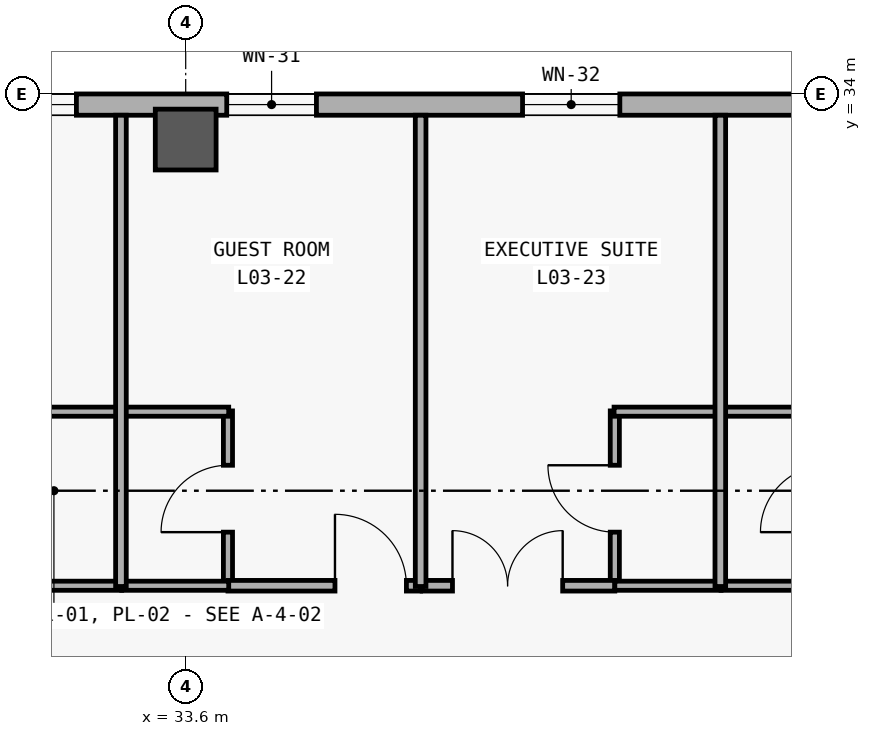
"""IFC4 building model, lengths in metres.
Left out: names, types, materials, properties, quantities, classifications, styles, units other than length and angle.
Written with IfcOpenShell. Run it as: python <this file> out.ifc"""

import sys

from ifc_helpers import new_model, si_unit, direction, frame, frame_2d, origin, origin_2d, place, context, subcontext, project, spatial, rectangle, extrude, element, fill, save


model = new_model("IFC4")
c1 = context("Model", 3, precision=1e-05, world=origin(), true_north=direction((0.0, 1.0)))
c2 = subcontext(c1, "Body", "Model", "MODEL_VIEW")
j1 = project(units=[si_unit("LENGTHUNIT", "METRE"), si_unit("PLANEANGLEUNIT", "RADIAN")], contexts=[c1])
p1 = place(None, origin())
s1 = spatial("IfcSite", under=j1, at=p1, CompositionType="ELEMENT")
p2 = place(p1, origin())
s2 = spatial("IfcBuilding", under=s1, at=p2, CompositionType="ELEMENT")
p3 = place(p2, frame((0.0, 0.0, 15.0)))
s3 = spatial("IfcBuildingStorey", under=s2, at=p3, CompositionType="ELEMENT", Elevation=15.0)
p4 = place(p3, frame((33.6, 33.4, 0.0), z_axis=(0.0, 0.0, 1.0), x_axis=(1.0, 0.0, 0.0)))
e1 = element("IfcColumn", 1, at=p4, inside=s3, PredefinedType="COLUMN", context=c2, shape_type="SweptSolid", body=[
    extrude(rectangle(XDim=0.8, YDim=0.8, at=origin_2d()), origin(), (0.0, 0.0, 1.0), 4.2),
])
p5 = place(p3, frame((8.68, 33.86, 0.0), z_axis=(0.0, 0.0, 1.0), x_axis=(1.0, 0.0, 0.0)))
e2 = element("IfcWall", 2, at=p5, inside=s3, PredefinedType="SOLIDWALL", context=c2, shape_type="SweptSolid", body=[
    extrude(rectangle(XDim=83.44, YDim=0.28, at=frame_2d((41.72, 0.0))), origin(), (0.0, 0.0, 1.0), 3.92),
])
p6 = place(p5, frame((4.895, 0.0, 0.85)))
e3 = element("IfcOpeningElement", 3, at=p6, cuts=e2, PredefinedType="OPENING", context=c2, shape_type="SweptSolid", body=[
    extrude(rectangle(XDim=2.6, YDim=2.2, at=frame_2d((1.3, 1.1))), frame((0.0, 0.15, 0.0), z_axis=(0.0, -1.0, 0.0), x_axis=(1.0, 0.0, 0.0)), (0.0, 0.0, 1.0), 0.3),
])
p7 = place(p5, frame((13.371, 0.0, 0.85)))
e4 = element("IfcOpeningElement", 4, at=p7, cuts=e2, PredefinedType="OPENING", context=c2, shape_type="SweptSolid", body=[
    extrude(rectangle(XDim=1.7, YDim=2.0, at=frame_2d((0.85, 1.0))), frame((0.0, 0.15, 0.0), z_axis=(0.0, -1.0, 0.0), x_axis=(1.0, 0.0, 0.0)), (0.0, 0.0, 1.0), 0.3),
])
p8 = place(p5, frame((17.015, 0.0, 0.85)))
e5 = element("IfcOpeningElement", 5, at=p8, cuts=e2, PredefinedType="OPENING", context=c2, shape_type="SweptSolid", body=[
    extrude(rectangle(XDim=2.3, YDim=2.05, at=frame_2d((1.15, 1.025))), frame((0.0, 0.15, 0.0), z_axis=(0.0, -1.0, 0.0), x_axis=(1.0, 0.0, 0.0)), (0.0, 0.0, 1.0), 0.3),
])
p9 = place(p5, frame((20.732, 0.0, 0.85)))
e6 = element("IfcOpeningElement", 6, at=p9, cuts=e2, PredefinedType="OPENING", context=c2, shape_type="SweptSolid", body=[
    extrude(rectangle(XDim=2.75, YDim=2.1, at=frame_2d((1.375, 1.05))), frame((0.0, 0.15, 0.0), z_axis=(0.0, -1.0, 0.0), x_axis=(1.0, 0.0, 0.0)), (0.0, 0.0, 1.0), 0.3),
])
p10 = place(p5, frame((25.46, 0.0, 0.85)))
e7 = element("IfcOpeningElement", 7, at=p10, cuts=e2, PredefinedType="OPENING", context=c2, shape_type="SweptSolid", body=[
    extrude(rectangle(XDim=1.18, YDim=1.5, at=frame_2d((0.59, 0.75))), frame((0.0, 0.15, 0.0), z_axis=(0.0, -1.0, 0.0), x_axis=(1.0, 0.0, 0.0)), (0.0, 0.0, 1.0), 0.3),
])
p11 = place(p5, frame((29.352, 0.0, 0.85)))
e8 = element("IfcOpeningElement", 8, at=p11, cuts=e2, PredefinedType="OPENING", context=c2, shape_type="SweptSolid", body=[
    extrude(rectangle(XDim=1.28, YDim=1.6, at=frame_2d((0.64, 0.8))), frame((0.0, 0.15, 0.0), z_axis=(0.0, -1.0, 0.0), x_axis=(1.0, 0.0, 0.0)), (0.0, 0.0, 1.0), 0.3),
])
p12 = place(p5, frame((33.245, 0.0, 0.85)))
e9 = element("IfcOpeningElement", 9, at=p12, cuts=e2, PredefinedType="OPENING", context=c2, shape_type="SweptSolid", body=[
    extrude(rectangle(XDim=1.38, YDim=1.7, at=frame_2d((0.69, 0.85))), frame((0.0, 0.15, 0.0), z_axis=(0.0, -1.0, 0.0), x_axis=(1.0, 0.0, 0.0)), (0.0, 0.0, 1.0), 0.3),
])
p13 = place(p5, frame((37.138, 0.0, 0.85)))
e10 = element("IfcOpeningElement", 10, at=p13, cuts=e2, PredefinedType="OPENING", context=c2, shape_type="SweptSolid", body=[
    extrude(rectangle(XDim=1.48, YDim=1.8, at=frame_2d((0.74, 0.9))), frame((0.0, 0.15, 0.0), z_axis=(0.0, -1.0, 0.0), x_axis=(1.0, 0.0, 0.0)), (0.0, 0.0, 1.0), 0.3),
])
p14 = place(p5, frame((41.031, 0.0, 0.85)))
e11 = element("IfcOpeningElement", 11, at=p14, cuts=e2, PredefinedType="OPENING", context=c2, shape_type="SweptSolid", body=[
    extrude(rectangle(XDim=1.58, YDim=1.85, at=frame_2d((0.79, 0.925))), frame((0.0, 0.15, 0.0), z_axis=(0.0, -1.0, 0.0), x_axis=(1.0, 0.0, 0.0)), (0.0, 0.0, 1.0), 0.3),
])
p15 = place(p5, frame((44.923, 0.0, 0.85)))
e12 = element("IfcOpeningElement", 12, at=p15, cuts=e2, PredefinedType="OPENING", context=c2, shape_type="SweptSolid", body=[
    extrude(rectangle(XDim=1.68, YDim=1.9, at=frame_2d((0.84, 0.95))), frame((0.0, 0.15, 0.0), z_axis=(0.0, -1.0, 0.0), x_axis=(1.0, 0.0, 0.0)), (0.0, 0.0, 1.0), 0.3),
])
p16 = place(p5, frame((48.816, 0.0, 0.85)))
e13 = element("IfcOpeningElement", 13, at=p16, cuts=e2, PredefinedType="OPENING", context=c2, shape_type="SweptSolid", body=[
    extrude(rectangle(XDim=1.78, YDim=1.95, at=frame_2d((0.89, 0.975))), frame((0.0, 0.15, 0.0), z_axis=(0.0, -1.0, 0.0), x_axis=(1.0, 0.0, 0.0)), (0.0, 0.0, 1.0), 0.3),
])
p17 = place(p5, frame((52.71, 0.0, 0.85)))
e14 = element("IfcOpeningElement", 14, at=p17, cuts=e2, PredefinedType="OPENING", context=c2, shape_type="SweptSolid", body=[
    extrude(rectangle(XDim=1.88, YDim=1.95, at=frame_2d((0.94, 0.975))), frame((0.0, 0.15, 0.0), z_axis=(0.0, -1.0, 0.0), x_axis=(1.0, 0.0, 0.0)), (0.0, 0.0, 1.0), 0.3),
])
p18 = place(p5, frame((56.567, 0.0, 0.85)))
e15 = element("IfcOpeningElement", 15, at=p18, cuts=e2, PredefinedType="OPENING", context=c2, shape_type="SweptSolid", body=[
    extrude(rectangle(XDim=2.05, YDim=1.95, at=frame_2d((1.025, 0.975))), frame((0.0, 0.15, 0.0), z_axis=(0.0, -1.0, 0.0), x_axis=(1.0, 0.0, 0.0)), (0.0, 0.0, 1.0), 0.3),
])
p19 = place(p5, frame((60.444, 0.0, 0.85)))
e16 = element("IfcOpeningElement", 16, at=p19, cuts=e2, PredefinedType="OPENING", context=c2, shape_type="SweptSolid", body=[
    extrude(rectangle(XDim=2.18, YDim=1.95, at=frame_2d((1.09, 0.975))), frame((0.0, 0.15, 0.0), z_axis=(0.0, -1.0, 0.0), x_axis=(1.0, 0.0, 0.0)), (0.0, 0.0, 1.0), 0.3),
])
p20 = place(p5, frame((64.287, 0.0, 0.85)))
e17 = element("IfcOpeningElement", 17, at=p20, cuts=e2, PredefinedType="OPENING", context=c2, shape_type="SweptSolid", body=[
    extrude(rectangle(XDim=2.38, YDim=1.95, at=frame_2d((1.19, 0.975))), frame((0.0, 0.15, 0.0), z_axis=(0.0, -1.0, 0.0), x_axis=(1.0, 0.0, 0.0)), (0.0, 0.0, 1.0), 0.3),
])
p21 = place(p5, frame((68.181, 0.0, 0.85)))
e18 = element("IfcOpeningElement", 18, at=p21, cuts=e2, PredefinedType="OPENING", context=c2, shape_type="SweptSolid", body=[
    extrude(rectangle(XDim=2.48, YDim=2.0, at=frame_2d((1.24, 1.0))), frame((0.0, 0.15, 0.0), z_axis=(0.0, -1.0, 0.0), x_axis=(1.0, 0.0, 0.0)), (0.0, 0.0, 1.0), 0.3),
])
p22 = place(p5, frame((72.038, 0.0, 0.85)))
e19 = element("IfcOpeningElement", 19, at=p22, cuts=e2, PredefinedType="OPENING", context=c2, shape_type="SweptSolid", body=[
    extrude(rectangle(XDim=2.65, YDim=2.0, at=frame_2d((1.325, 1.0))), frame((0.0, 0.15, 0.0), z_axis=(0.0, -1.0, 0.0), x_axis=(1.0, 0.0, 0.0)), (0.0, 0.0, 1.0), 0.3),
])
p23 = place(p5, frame((75.831, 0.0, 0.85)))
e20 = element("IfcOpeningElement", 20, at=p23, cuts=e2, PredefinedType="OPENING", context=c2, shape_type="SweptSolid", body=[
    extrude(rectangle(XDim=2.95, YDim=2.05, at=frame_2d((1.475, 1.025))), frame((0.0, 0.15, 0.0), z_axis=(0.0, -1.0, 0.0), x_axis=(1.0, 0.0, 0.0)), (0.0, 0.0, 1.0), 0.3),
])
p24 = place(p5, frame((80.349, 0.0, 0.85)))
e21 = element("IfcOpeningElement", 21, at=p24, cuts=e2, PredefinedType="OPENING", context=c2, shape_type="SweptSolid", body=[
    extrude(rectangle(XDim=1.8, YDim=1.8, at=frame_2d((0.9, 0.9))), frame((0.0, 0.15, 0.0), z_axis=(0.0, -1.0, 0.0), x_axis=(1.0, 0.0, 0.0)), (0.0, 0.0, 1.0), 0.3),
])
p25 = place(p3, frame((34.156, 27.52, 0.0), z_axis=(0.0, 0.0, 1.0), x_axis=(0.0, 1.0, 0.0)))
e22 = element("IfcWall", 22, at=p25, inside=s3, PredefinedType="PARTITIONING", context=c2, shape_type="SweptSolid", body=[
    extrude(rectangle(XDim=2.31, YDim=0.12, at=frame_2d((1.155, 0.0))), origin(), (0.0, 0.0, 1.0), 3.02),
])
p26 = place(p25, frame((0.715, 0.0, 0.0)))
e23 = element("IfcOpeningElement", 23, at=p26, cuts=e22, PredefinedType="OPENING", context=c2, shape_type="SweptSolid", body=[
    extrude(rectangle(XDim=0.88, YDim=2.15, at=frame_2d((0.44, 1.075))), frame((0.0, 0.07, 0.0), z_axis=(0.0, -1.0, 0.0), x_axis=(1.0, 0.0, 0.0)), (0.0, 0.0, 1.0), 0.14),
])
p27 = place(p3, frame((39.246, 27.52, 0.0), z_axis=(0.0, 0.0, 1.0), x_axis=(0.0, 1.0, 0.0)))
e24 = element("IfcWall", 24, at=p27, inside=s3, PredefinedType="PARTITIONING", context=c2, shape_type="SweptSolid", body=[
    extrude(rectangle(XDim=2.31, YDim=0.12, at=frame_2d((1.155, 0.0))), origin(), (0.0, 0.0, 1.0), 3.02),
])
p28 = place(p27, frame((0.715, 0.0, 0.0)))
e25 = element("IfcOpeningElement", 25, at=p28, cuts=e24, PredefinedType="OPENING", context=c2, shape_type="SweptSolid", body=[
    extrude(rectangle(XDim=0.88, YDim=2.15, at=frame_2d((0.44, 1.075))), frame((0.0, 0.07, 0.0), z_axis=(0.0, -1.0, 0.0), x_axis=(1.0, 0.0, 0.0)), (0.0, 0.0, 1.0), 0.14),
])
p29 = place(p3, frame((34.156, 27.53, 0.0), z_axis=(0.0, 0.0, 1.0), x_axis=(1.0, 0.0, 0.0)))
e26 = element("IfcWall", 26, at=p29, inside=s3, PredefinedType="PARTITIONING", context=c2, shape_type="SweptSolid", body=[
    extrude(rectangle(XDim=2.535, YDim=0.14, at=frame_2d((1.268, 0.0))), origin(), (0.0, 0.0, 1.0), 3.02),
])
p30 = place(p29, frame((1.408, 0.0, 0.0)))
e27 = element("IfcOpeningElement", 27, at=p30, cuts=e26, PredefinedType="OPENING", context=c2, shape_type="SweptSolid", body=[
    extrude(rectangle(XDim=0.94, YDim=2.2, at=frame_2d((0.47, 1.1))), frame((0.0, 0.08, 0.0), z_axis=(0.0, -1.0, 0.0), x_axis=(1.0, 0.0, 0.0)), (0.0, 0.0, 1.0), 0.16),
])
p31 = place(p3, frame((36.711, 27.53, 0.0), z_axis=(0.0, 0.0, 1.0), x_axis=(1.0, 0.0, 0.0)))
e28 = element("IfcWall", 28, at=p31, inside=s3, PredefinedType="PARTITIONING", context=c2, shape_type="SweptSolid", body=[
    extrude(rectangle(XDim=2.535, YDim=0.14, at=frame_2d((1.268, 0.0))), origin(), (0.0, 0.0, 1.0), 3.02),
])
p32 = place(p31, frame((0.399, 0.0, 0.0)))
e29 = element("IfcOpeningElement", 29, at=p32, cuts=e28, PredefinedType="OPENING", context=c2, shape_type="SweptSolid", body=[
    extrude(rectangle(XDim=1.45, YDim=2.3, at=frame_2d((0.725, 1.15))), frame((0.0, 0.08, 0.0), z_axis=(0.0, -1.0, 0.0), x_axis=(1.0, 0.0, 0.0)), (0.0, 0.0, 1.0), 0.16),
])
for number, where, z_axis, x_axis in (
    (30, (31.35, 27.53, 0.0), (0.0, 0.0, 1.0), (1.0, 0.0, 0.0)),
    (31, (31.35, 29.82, 0.0), (0.0, 0.0, 1.0), (1.0, 0.0, 0.0)),
    (32, (32.758, 27.53, 0.0), (0.0, 0.0, 1.0), (1.0, 0.0, 0.0)),
    (33, (32.758, 29.82, 0.0), (0.0, 0.0, 1.0), (1.0, 0.0, 0.0)),
):
    element("IfcWall", number, at=place(p3, frame(where, z_axis=z_axis, x_axis=x_axis)), inside=s3, PredefinedType="PARTITIONING", context=c2, shape_type="SweptSolid", body=[
        extrude(rectangle(XDim=1.408, YDim=0.12, at=frame_2d((0.704, 0.0))), origin(), (0.0, 0.0, 1.0), 3.02),
    ])
p33 = place(p3, frame((39.246, 27.53, 0.0), z_axis=(0.0, 0.0, 1.0), x_axis=(1.0, 0.0, 0.0)))
e34 = element("IfcWall", 34, at=p33, inside=s3, PredefinedType="PARTITIONING", context=c2, shape_type="SweptSolid", body=[
    extrude(rectangle(XDim=1.398, YDim=0.12, at=frame_2d((0.699, 0.0))), origin(), (0.0, 0.0, 1.0), 3.02),
])
for number, where, z_axis, x_axis in (
    (35, (39.236, 29.82, 0.0), (0.0, 0.0, 1.0), (1.0, 0.0, 0.0)),
    (36, (40.644, 27.53, 0.0), (0.0, 0.0, 1.0), (1.0, 0.0, 0.0)),
    (37, (40.644, 29.82, 0.0), (0.0, 0.0, 1.0), (1.0, 0.0, 0.0)),
):
    element("IfcWall", number, at=place(p3, frame(where, z_axis=z_axis, x_axis=x_axis)), inside=s3, PredefinedType="PARTITIONING", context=c2, shape_type="SweptSolid", body=[
        extrude(rectangle(XDim=1.408, YDim=0.12, at=frame_2d((0.704, 0.0))), origin(), (0.0, 0.0, 1.0), 3.02),
    ])
for number, where, z_axis, x_axis in (
    (38, (32.748, 27.52, 0.0), (0.0, 0.0, 1.0), (0.0, 1.0, 0.0)),
    (39, (36.691, 27.52, 0.0), (0.0, 0.0, 1.0), (0.0, 1.0, 0.0)),
    (40, (40.634, 27.52, 0.0), (0.0, 0.0, 1.0), (0.0, 1.0, 0.0)),
):
    element("IfcWall", number, at=place(p3, frame(where, z_axis=z_axis, x_axis=x_axis)), inside=s3, PredefinedType="PARTITIONING", context=c2, shape_type="SweptSolid", body=[
        extrude(rectangle(XDim=6.2, YDim=0.14, at=frame_2d((3.1, 0.0))), origin(), (0.0, 0.0, 1.0), 3.02),
    ])
p34 = place(p9, origin())
e41 = element("IfcWindow", 41, at=p34, inside=s3, PartitioningType="SINGLE_PANEL", PredefinedType="WINDOW", context=c2, shape_type="SweptSolid", body=[
    extrude(rectangle(XDim=2.75, YDim=2.1, at=frame_2d((1.375, 1.05))), frame((0.0, 0.03, 0.0), z_axis=(0.0, -1.0, 0.0), x_axis=(1.0, 0.0, 0.0)), (0.0, 0.0, 1.0), 0.06),
])
fill(e6, e41)
p35 = place(p10, origin())
e42 = element("IfcWindow", 42, at=p35, inside=s3, PartitioningType="SINGLE_PANEL", PredefinedType="WINDOW", context=c2, shape_type="SweptSolid", body=[
    extrude(rectangle(XDim=1.18, YDim=1.5, at=frame_2d((0.59, 0.75))), frame((0.0, 0.03, 0.0), z_axis=(0.0, -1.0, 0.0), x_axis=(1.0, 0.0, 0.0)), (0.0, 0.0, 1.0), 0.06),
])
fill(e7, e42)
p36 = place(p11, origin())
e43 = element("IfcWindow", 43, at=p36, inside=s3, PartitioningType="SINGLE_PANEL", PredefinedType="WINDOW", context=c2, shape_type="SweptSolid", body=[
    extrude(rectangle(XDim=1.28, YDim=1.6, at=frame_2d((0.64, 0.8))), frame((0.0, 0.03, 0.0), z_axis=(0.0, -1.0, 0.0), x_axis=(1.0, 0.0, 0.0)), (0.0, 0.0, 1.0), 0.06),
])
fill(e8, e43)
p37 = place(p26, origin())
e44 = element("IfcDoor", 44, at=p37, inside=s3, OperationType="SINGLE_SWING_LEFT", PredefinedType="DOOR", context=c2, shape_type="SweptSolid", body=[
    extrude(rectangle(XDim=0.88, YDim=2.15, at=frame_2d((0.44, 1.075))), frame((0.0, 0.025, 0.0), z_axis=(0.0, -1.0, 0.0), x_axis=(1.0, 0.0, 0.0)), (0.0, 0.0, 1.0), 0.05),
])
fill(e23, e44)
p38 = place(p28, origin())
e45 = element("IfcDoor", 45, at=p38, inside=s3, OperationType="SINGLE_SWING_RIGHT", PredefinedType="DOOR", context=c2, shape_type="SweptSolid", body=[
    extrude(rectangle(XDim=0.88, YDim=2.15, at=frame_2d((0.44, 1.075))), frame((0.0, 0.025, 0.0), z_axis=(0.0, -1.0, 0.0), x_axis=(1.0, 0.0, 0.0)), (0.0, 0.0, 1.0), 0.05),
])
fill(e25, e45)
p39 = place(p30, origin())
e46 = element("IfcDoor", 46, at=p39, inside=s3, OperationType="SINGLE_SWING_LEFT", PredefinedType="DOOR", context=c2, shape_type="SweptSolid", body=[
    extrude(rectangle(XDim=0.94, YDim=2.2, at=frame_2d((0.47, 1.1))), frame((0.0, 0.025, 0.0), z_axis=(0.0, -1.0, 0.0), x_axis=(1.0, 0.0, 0.0)), (0.0, 0.0, 1.0), 0.05),
])
fill(e27, e46)
p40 = place(p32, origin())
e47 = element("IfcDoor", 47, at=p40, inside=s3, OperationType="DOUBLE_DOOR_SINGLE_SWING", PredefinedType="DOOR", context=c2, shape_type="SweptSolid", body=[
    extrude(rectangle(XDim=1.45, YDim=2.3, at=frame_2d((0.725, 1.15))), frame((0.0, 0.025, 0.0), z_axis=(0.0, -1.0, 0.0), x_axis=(1.0, 0.0, 0.0)), (0.0, 0.0, 1.0), 0.05),
])
fill(e29, e47)
save(model, sys.argv[1])
